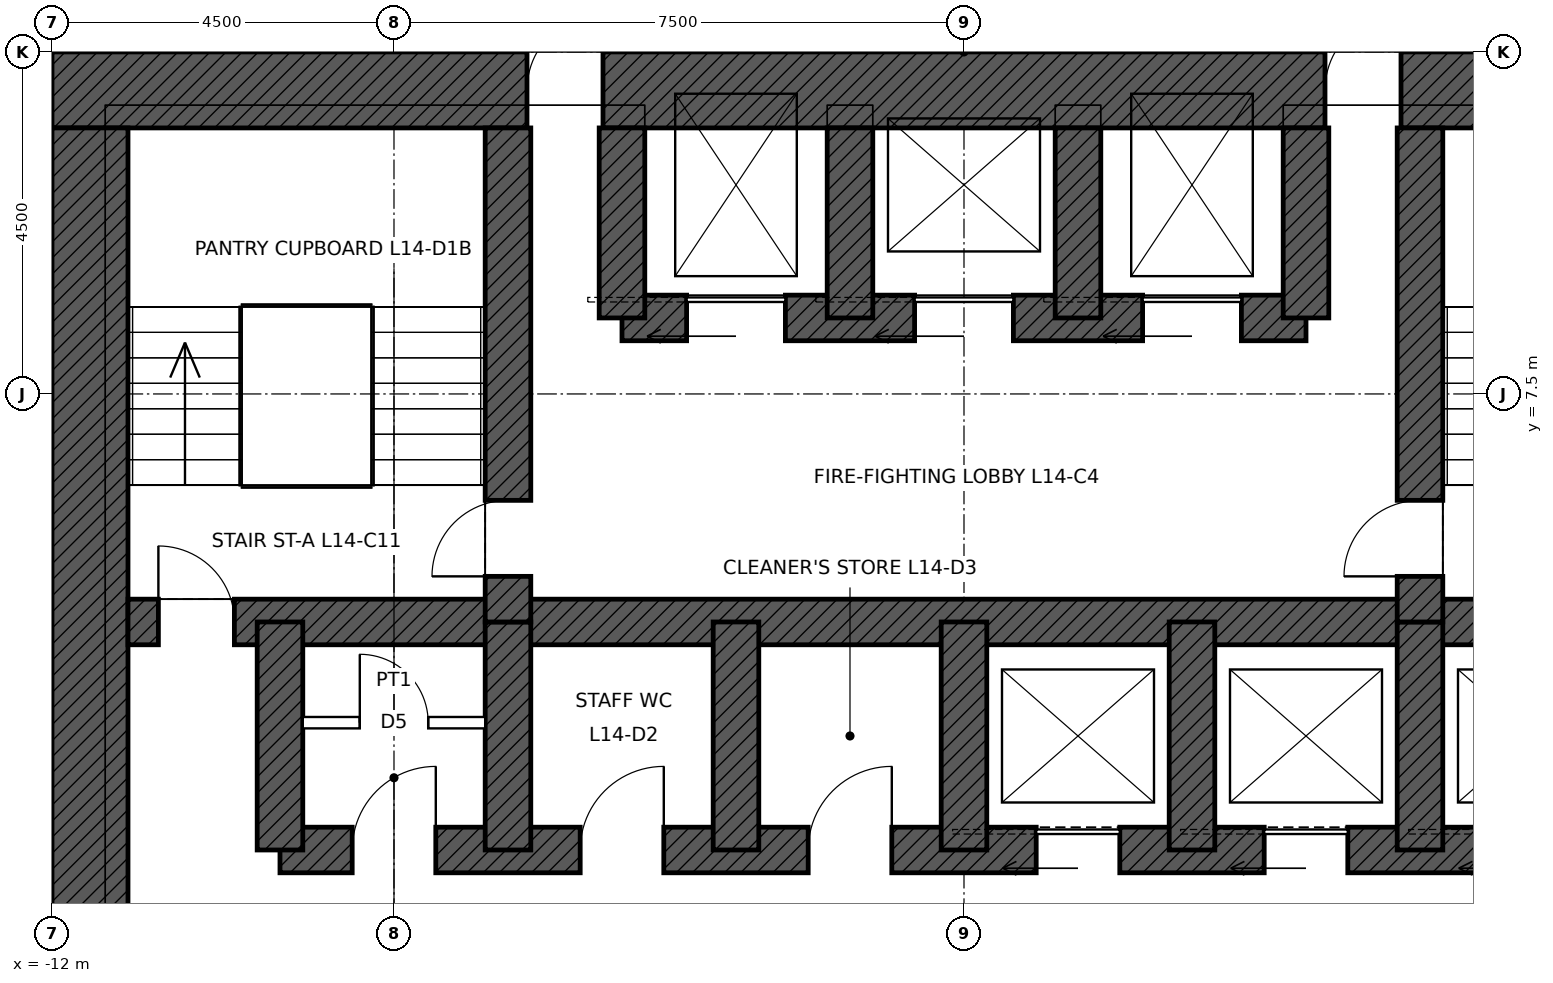
"""IFC4 building model, lengths in metres.
Left out: names, types, materials, properties, quantities, classifications, styles, units other than length and angle.
Written with IfcOpenShell. Run it as: python <this file> out.ifc"""

import sys

from ifc_helpers import new_model, si_unit, direction, frame, frame_2d, origin, place, context, subcontext, project, spatial, rectangle, extrude, element, fill, save


model = new_model("IFC4")
c1 = context("Model", 3, precision=1e-05, world=origin(), true_north=direction((0.0, 1.0)))
c2 = subcontext(c1, "Body", "Model", "MODEL_VIEW")
j1 = project(units=[si_unit("LENGTHUNIT", "METRE"), si_unit("PLANEANGLEUNIT", "RADIAN")], contexts=[c1])
p1 = place(None, origin())
s1 = spatial("IfcSite", under=j1, at=p1, CompositionType="ELEMENT")
p2 = place(p1, origin())
s2 = spatial("IfcBuilding", under=s1, at=p2, CompositionType="ELEMENT")
p3 = place(p2, frame((0.0, 0.0, 73.4)))
s3 = spatial("IfcBuildingStorey", under=s2, at=p3, CompositionType="ELEMENT", Elevation=73.4)
p4 = place(p3, frame((-12.0, 11.5, 0.0), z_axis=(0.0, 0.0, 1.0), x_axis=(1.0, 0.0, 0.0)))
e1 = element("IfcWall", 1, at=p4, inside=s3, PredefinedType="SHEAR", context=c2, shape_type="SweptSolid", body=[
    extrude(rectangle(XDim=24.0, YDim=1.0, at=frame_2d((12.0, 0.0))), origin(), (0.0, 0.0, 1.0), 5.0),
])
p5 = place(p4, frame((6.25, 0.0, 0.0)))
e2 = element("IfcOpeningElement", 2, at=p5, cuts=e1, PredefinedType="OPENING", context=c2, shape_type="SweptSolid", body=[
    extrude(rectangle(XDim=1.0, YDim=2.4, at=frame_2d((0.5, 1.2))), frame((0.0, 0.51, 0.0), z_axis=(0.0, -1.0, 0.0), x_axis=(1.0, 0.0, 0.0)), (0.0, 0.0, 1.0), 1.02),
])
p6 = place(p4, frame((16.75, 0.0, 0.0)))
e3 = element("IfcOpeningElement", 3, at=p6, cuts=e1, PredefinedType="OPENING", context=c2, shape_type="SweptSolid", body=[
    extrude(rectangle(XDim=1.0, YDim=2.4, at=frame_2d((0.5, 1.2))), frame((0.0, 0.51, 0.0), z_axis=(0.0, -1.0, 0.0), x_axis=(1.0, 0.0, 0.0)), (0.0, 0.0, 1.0), 1.02),
])
p7 = place(p3, frame((-11.5, -11.0, 0.0), z_axis=(0.0, 0.0, 1.0), x_axis=(0.0, 1.0, 0.0)))
e4 = element("IfcWall", 4, at=p7, inside=s3, PredefinedType="SHEAR", context=c2, shape_type="SweptSolid", body=[
    extrude(rectangle(XDim=22.0, YDim=1.0, at=frame_2d((11.0, 0.0))), origin(), (0.0, 0.0, 1.0), 5.0),
])
p8 = place(p7, frame((10.5, 0.0, 0.0)))
e5 = element("IfcOpeningElement", 5, at=p8, cuts=e4, PredefinedType="OPENING", context=c2, shape_type="SweptSolid", body=[
    extrude(rectangle(XDim=1.0, YDim=2.4, at=frame_2d((0.5, 1.2))), frame((0.0, 0.51, 0.0), z_axis=(0.0, -1.0, 0.0), x_axis=(1.0, 0.0, 0.0)), (0.0, 0.0, 1.0), 1.02),
])
p9 = place(p3, frame((-11.0, 4.5, 0.0), z_axis=(0.0, 0.0, 1.0), x_axis=(1.0, 0.0, 0.0)))
e6 = element("IfcWall", 6, at=p9, inside=s3, PredefinedType="SHEAR", context=c2, shape_type="SweptSolid", body=[
    extrude(rectangle(XDim=22.0, YDim=0.6, at=frame_2d((11.0, 0.0))), origin(), (0.0, 0.0, 1.0), 5.0),
])
p10 = place(p9, frame((0.4, 0.0, 0.0)))
e7 = element("IfcOpeningElement", 7, at=p10, cuts=e6, PredefinedType="OPENING", context=c2, shape_type="SweptSolid", body=[
    extrude(rectangle(XDim=1.0, YDim=2.1, at=frame_2d((0.5, 1.05))), frame((0.0, 0.31, 0.0), z_axis=(0.0, -1.0, 0.0), x_axis=(1.0, 0.0, 0.0)), (0.0, 0.0, 1.0), 0.62),
])
p11 = place(p9, frame((20.6, 0.0, 0.0)))
e8 = element("IfcOpeningElement", 8, at=p11, cuts=e6, PredefinedType="OPENING", context=c2, shape_type="SweptSolid", body=[
    extrude(rectangle(XDim=1.0, YDim=2.1, at=frame_2d((0.5, 1.05))), frame((0.0, 0.31, 0.0), z_axis=(0.0, -1.0, 0.0), x_axis=(1.0, 0.0, 0.0)), (0.0, 0.0, 1.0), 0.62),
])
p12 = place(p3, frame((-9.0, 1.5, 0.0), z_axis=(0.0, 0.0, 1.0), x_axis=(1.0, 0.0, 0.0)))
e9 = element("IfcWall", 9, at=p12, inside=s3, PredefinedType="SHEAR", context=c2, shape_type="SweptSolid", body=[
    extrude(rectangle(XDim=18.0, YDim=0.6, at=frame_2d((9.0, 0.0))), origin(), (0.0, 0.0, 1.0), 5.0),
])
p13 = place(p12, frame((9.95, 0.0, 0.0)))
e10 = element("IfcOpeningElement", 10, at=p13, cuts=e9, PredefinedType="OPENING", context=c2, shape_type="SweptSolid", body=[
    extrude(rectangle(XDim=1.1, YDim=2.1, at=frame_2d((0.55, 1.05))), frame((0.0, 0.31, 0.0), z_axis=(0.0, -1.0, 0.0), x_axis=(1.0, 0.0, 0.0)), (0.0, 0.0, 1.0), 0.62),
])
p14 = place(p12, frame((12.95, 0.0, 0.0)))
e11 = element("IfcOpeningElement", 11, at=p14, cuts=e9, PredefinedType="OPENING", context=c2, shape_type="SweptSolid", body=[
    extrude(rectangle(XDim=1.1, YDim=2.1, at=frame_2d((0.55, 1.05))), frame((0.0, 0.31, 0.0), z_axis=(0.0, -1.0, 0.0), x_axis=(1.0, 0.0, 0.0)), (0.0, 0.0, 1.0), 0.62),
])
p15 = place(p12, frame((15.95, 0.0, 0.0)))
e12 = element("IfcOpeningElement", 12, at=p15, cuts=e9, PredefinedType="OPENING", context=c2, shape_type="SweptSolid", body=[
    extrude(rectangle(XDim=1.1, YDim=2.1, at=frame_2d((0.55, 1.05))), frame((0.0, 0.31, 0.0), z_axis=(0.0, -1.0, 0.0), x_axis=(1.0, 0.0, 0.0)), (0.0, 0.0, 1.0), 0.62),
])
p16 = place(p12, frame((0.95, 0.0, 0.0)))
e13 = element("IfcOpeningElement", 13, at=p16, cuts=e9, PredefinedType="OPENING", context=c2, shape_type="SweptSolid", body=[
    extrude(rectangle(XDim=1.1, YDim=2.1, at=frame_2d((0.55, 1.05))), frame((0.0, 0.31, 0.0), z_axis=(0.0, -1.0, 0.0), x_axis=(1.0, 0.0, 0.0)), (0.0, 0.0, 1.0), 0.62),
])
p17 = place(p12, frame((3.95, 0.0, 0.0)))
e14 = element("IfcOpeningElement", 14, at=p17, cuts=e9, PredefinedType="OPENING", context=c2, shape_type="SweptSolid", body=[
    extrude(rectangle(XDim=1.1, YDim=2.1, at=frame_2d((0.55, 1.05))), frame((0.0, 0.31, 0.0), z_axis=(0.0, -1.0, 0.0), x_axis=(1.0, 0.0, 0.0)), (0.0, 0.0, 1.0), 0.62),
])
p18 = place(p12, frame((6.95, 0.0, 0.0)))
e15 = element("IfcOpeningElement", 15, at=p18, cuts=e9, PredefinedType="OPENING", context=c2, shape_type="SweptSolid", body=[
    extrude(rectangle(XDim=1.1, YDim=2.1, at=frame_2d((0.55, 1.05))), frame((0.0, 0.31, 0.0), z_axis=(0.0, -1.0, 0.0), x_axis=(1.0, 0.0, 0.0)), (0.0, 0.0, 1.0), 0.62),
])
p19 = place(p3, frame((-4.5, 8.5, 0.0), z_axis=(0.0, 0.0, 1.0), x_axis=(1.0, 0.0, 0.0)))
e16 = element("IfcWall", 16, at=p19, inside=s3, PredefinedType="SHEAR", context=c2, shape_type="SweptSolid", body=[
    extrude(rectangle(XDim=9.0, YDim=0.6, at=frame_2d((4.5, 0.0))), origin(), (0.0, 0.0, 1.0), 5.0),
])
p20 = place(p19, frame((0.85, 0.0, 0.0)))
e17 = element("IfcOpeningElement", 17, at=p20, cuts=e16, PredefinedType="OPENING", context=c2, shape_type="SweptSolid", body=[
    extrude(rectangle(XDim=1.3, YDim=2.4, at=frame_2d((0.65, 1.2))), frame((0.0, 0.31, 0.0), z_axis=(0.0, -1.0, 0.0), x_axis=(1.0, 0.0, 0.0)), (0.0, 0.0, 1.0), 0.62),
])
p21 = place(p19, frame((6.85, 0.0, 0.0)))
e18 = element("IfcOpeningElement", 18, at=p21, cuts=e16, PredefinedType="OPENING", context=c2, shape_type="SweptSolid", body=[
    extrude(rectangle(XDim=1.3, YDim=2.4, at=frame_2d((0.65, 1.2))), frame((0.0, 0.31, 0.0), z_axis=(0.0, -1.0, 0.0), x_axis=(1.0, 0.0, 0.0)), (0.0, 0.0, 1.0), 0.62),
])
p22 = place(p19, frame((3.85, 0.0, 0.0)))
e19 = element("IfcOpeningElement", 19, at=p22, cuts=e16, PredefinedType="OPENING", context=c2, shape_type="SweptSolid", body=[
    extrude(rectangle(XDim=1.3, YDim=2.4, at=frame_2d((0.65, 1.2))), frame((0.0, 0.31, 0.0), z_axis=(0.0, -1.0, 0.0), x_axis=(1.0, 0.0, 0.0)), (0.0, 0.0, 1.0), 0.62),
])
for number, where, z_axis, x_axis in (
    (20, (-9.0, 1.5, 0.0), (0.0, 0.0, 1.0), (0.0, 1.0, 0.0)),
    (21, (-6.0, 1.5, 0.0), (0.0, 0.0, 1.0), (0.0, 1.0, 0.0)),
    (22, (-3.0, 1.5, 0.0), (0.0, 0.0, 1.0), (0.0, 1.0, 0.0)),
    (23, (0.0, 1.5, 0.0), (0.0, 0.0, 1.0), (0.0, 1.0, 0.0)),
    (24, (3.0, 1.5, 0.0), (0.0, 0.0, 1.0), (0.0, 1.0, 0.0)),
    (25, (6.0, 1.5, 0.0), (0.0, 0.0, 1.0), (0.0, 1.0, 0.0)),
):
    element("IfcWall", number, at=place(p3, frame(where, z_axis=z_axis, x_axis=x_axis)), inside=s3, PredefinedType="SHEAR", context=c2, shape_type="SweptSolid", body=[
        extrude(rectangle(XDim=3.0, YDim=0.6, at=frame_2d((1.5, 0.0))), origin(), (0.0, 0.0, 1.0), 5.0),
    ])
p23 = place(p3, frame((-6.0, 4.5, 0.0), z_axis=(0.0, 0.0, 1.0), x_axis=(0.0, 1.0, 0.0)))
e26 = element("IfcWall", 26, at=p23, inside=s3, PredefinedType="SHEAR", context=c2, shape_type="SweptSolid", body=[
    extrude(rectangle(XDim=6.5, YDim=0.6, at=frame_2d((3.25, 0.0))), origin(), (0.0, 0.0, 1.0), 5.0),
])
p24 = place(p23, frame((0.6, 0.0, 0.0)))
e27 = element("IfcOpeningElement", 27, at=p24, cuts=e26, PredefinedType="OPENING", context=c2, shape_type="SweptSolid", body=[
    extrude(rectangle(XDim=1.0, YDim=2.1, at=frame_2d((0.5, 1.05))), frame((0.0, 0.31, 0.0), z_axis=(0.0, -1.0, 0.0), x_axis=(1.0, 0.0, 0.0)), (0.0, 0.0, 1.0), 0.62),
])
p25 = place(p3, frame((6.0, 4.5, 0.0), z_axis=(0.0, 0.0, 1.0), x_axis=(0.0, 1.0, 0.0)))
e28 = element("IfcWall", 28, at=p25, inside=s3, PredefinedType="SHEAR", context=c2, shape_type="SweptSolid", body=[
    extrude(rectangle(XDim=6.5, YDim=0.6, at=frame_2d((3.25, 0.0))), origin(), (0.0, 0.0, 1.0), 5.0),
])
p26 = place(p25, frame((0.6, 0.0, 0.0)))
e29 = element("IfcOpeningElement", 29, at=p26, cuts=e28, PredefinedType="OPENING", context=c2, shape_type="SweptSolid", body=[
    extrude(rectangle(XDim=1.0, YDim=2.1, at=frame_2d((0.5, 1.05))), frame((0.0, 0.31, 0.0), z_axis=(0.0, -1.0, 0.0), x_axis=(1.0, 0.0, 0.0)), (0.0, 0.0, 1.0), 0.62),
])
for number, where, z_axis, x_axis in (
    (30, (-4.5, 8.5, 0.0), (0.0, 0.0, 1.0), (0.0, 1.0, 0.0)),
    (31, (4.5, 8.5, 0.0), (0.0, 0.0, 1.0), (0.0, 1.0, 0.0)),
    (32, (-1.5, 8.5, 0.0), (0.0, 0.0, 1.0), (0.0, 1.0, 0.0)),
    (33, (1.5, 8.5, 0.0), (0.0, 0.0, 1.0), (0.0, 1.0, 0.0)),
):
    element("IfcWall", number, at=place(p3, frame(where, z_axis=z_axis, x_axis=x_axis)), inside=s3, PredefinedType="SHEAR", context=c2, shape_type="SweptSolid", body=[
        extrude(rectangle(XDim=2.5, YDim=0.6, at=frame_2d((1.25, 0.0))), origin(), (0.0, 0.0, 1.0), 5.0),
    ])
p27 = place(p3, frame((-8.7, 3.175, 0.0), z_axis=(0.0, 0.0, 1.0), x_axis=(1.0, 0.0, 0.0)))
e34 = element("IfcWall", 34, at=p27, inside=s3, PredefinedType="PARTITIONING", context=c2, shape_type="SweptSolid", body=[
    extrude(rectangle(XDim=2.4, YDim=0.15, at=frame_2d((1.2, 0.0))), origin(), (0.0, 0.0, 1.0), 4.75),
])
p28 = place(p27, frame((0.75, 0.0, 0.0)))
e35 = element("IfcOpeningElement", 35, at=p28, cuts=e34, PredefinedType="OPENING", context=c2, shape_type="SweptSolid", body=[
    extrude(rectangle(XDim=0.9, YDim=2.1, at=frame_2d((0.45, 1.05))), frame((0.0, 0.085, 0.0), z_axis=(0.0, -1.0, 0.0), x_axis=(1.0, 0.0, 0.0)), (0.0, 0.0, 1.0), 0.17),
])
p29 = place(p10, origin())
e36 = element("IfcDoor", 36, at=p29, inside=s3, OperationType="SINGLE_SWING_LEFT", PredefinedType="DOOR", context=c2, shape_type="SweptSolid", body=[
    extrude(rectangle(XDim=1.0, YDim=2.1, at=frame_2d((0.5, 1.05))), frame((0.0, 0.025, 0.0), z_axis=(0.0, -1.0, 0.0), x_axis=(1.0, 0.0, 0.0)), (0.0, 0.0, 1.0), 0.05),
])
fill(e7, e36)
p30 = place(p24, origin())
e37 = element("IfcDoor", 37, at=p30, inside=s3, OperationType="SINGLE_SWING_LEFT", PredefinedType="DOOR", context=c2, shape_type="SweptSolid", body=[
    extrude(rectangle(XDim=1.0, YDim=2.1, at=frame_2d((0.5, 1.05))), frame((0.0, 0.025, 0.0), z_axis=(0.0, -1.0, 0.0), x_axis=(1.0, 0.0, 0.0)), (0.0, 0.0, 1.0), 0.05),
])
fill(e27, e37)
p31 = place(p26, origin())
e38 = element("IfcDoor", 38, at=p31, inside=s3, OperationType="SINGLE_SWING_LEFT", PredefinedType="DOOR", context=c2, shape_type="SweptSolid", body=[
    extrude(rectangle(XDim=1.0, YDim=2.1, at=frame_2d((0.5, 1.05))), frame((0.0, 0.025, 0.0), z_axis=(0.0, -1.0, 0.0), x_axis=(1.0, 0.0, 0.0)), (0.0, 0.0, 1.0), 0.05),
])
fill(e29, e38)
p32 = place(p5, origin())
e39 = element("IfcDoor", 39, at=p32, inside=s3, OperationType="SINGLE_SWING_RIGHT", PredefinedType="DOOR", context=c2, shape_type="SweptSolid", body=[
    extrude(rectangle(XDim=1.0, YDim=2.4, at=frame_2d((0.5, 1.2))), frame((0.0, 0.485, 0.0), z_axis=(0.0, -1.0, 0.0), x_axis=(1.0, 0.0, 0.0)), (0.0, 0.0, 1.0), 0.05),
])
fill(e2, e39)
p33 = place(p6, origin())
e40 = element("IfcDoor", 40, at=p33, inside=s3, OperationType="SINGLE_SWING_RIGHT", PredefinedType="DOOR", context=c2, shape_type="SweptSolid", body=[
    extrude(rectangle(XDim=1.0, YDim=2.4, at=frame_2d((0.5, 1.2))), frame((0.0, 0.485, 0.0), z_axis=(0.0, -1.0, 0.0), x_axis=(1.0, 0.0, 0.0)), (0.0, 0.0, 1.0), 0.05),
])
fill(e3, e40)
p34 = place(p20, origin())
e41 = element("IfcDoor", 41, at=p34, inside=s3, OperationType="SLIDING_TO_LEFT", PredefinedType="DOOR", context=c2, shape_type="SweptSolid", body=[
    extrude(rectangle(XDim=1.3, YDim=2.4, at=frame_2d((0.65, 1.2))), frame((0.0, 0.025, 0.0), z_axis=(0.0, -1.0, 0.0), x_axis=(1.0, 0.0, 0.0)), (0.0, 0.0, 1.0), 0.05),
])
fill(e17, e41)
p35 = place(p21, origin())
e42 = element("IfcDoor", 42, at=p35, inside=s3, OperationType="SLIDING_TO_LEFT", PredefinedType="DOOR", context=c2, shape_type="SweptSolid", body=[
    extrude(rectangle(XDim=1.3, YDim=2.4, at=frame_2d((0.65, 1.2))), frame((0.0, 0.025, 0.0), z_axis=(0.0, -1.0, 0.0), x_axis=(1.0, 0.0, 0.0)), (0.0, 0.0, 1.0), 0.05),
])
fill(e18, e42)
p36 = place(p22, origin())
e43 = element("IfcDoor", 43, at=p36, inside=s3, OperationType="SLIDING_TO_LEFT", PredefinedType="DOOR", context=c2, shape_type="SweptSolid", body=[
    extrude(rectangle(XDim=1.3, YDim=2.4, at=frame_2d((0.65, 1.2))), frame((0.0, 0.025, 0.0), z_axis=(0.0, -1.0, 0.0), x_axis=(1.0, 0.0, 0.0)), (0.0, 0.0, 1.0), 0.05),
])
fill(e19, e43)
p37 = place(p13, origin())
e44 = element("IfcDoor", 44, at=p37, inside=s3, OperationType="SLIDING_TO_LEFT", PredefinedType="DOOR", context=c2, shape_type="SweptSolid", body=[
    extrude(rectangle(XDim=1.1, YDim=2.1, at=frame_2d((0.55, 1.05))), frame((0.0, 0.025, 0.0), z_axis=(0.0, -1.0, 0.0), x_axis=(1.0, 0.0, 0.0)), (0.0, 0.0, 1.0), 0.05),
])
fill(e10, e44)
p38 = place(p14, origin())
e45 = element("IfcDoor", 45, at=p38, inside=s3, OperationType="SLIDING_TO_LEFT", PredefinedType="DOOR", context=c2, shape_type="SweptSolid", body=[
    extrude(rectangle(XDim=1.1, YDim=2.1, at=frame_2d((0.55, 1.05))), frame((0.0, 0.025, 0.0), z_axis=(0.0, -1.0, 0.0), x_axis=(1.0, 0.0, 0.0)), (0.0, 0.0, 1.0), 0.05),
])
fill(e11, e45)
p39 = place(p16, origin())
e46 = element("IfcDoor", 46, at=p39, inside=s3, OperationType="SINGLE_SWING_RIGHT", PredefinedType="DOOR", context=c2, shape_type="SweptSolid", body=[
    extrude(rectangle(XDim=1.1, YDim=2.1, at=frame_2d((0.55, 1.05))), frame((0.0, 0.025, 0.0), z_axis=(0.0, -1.0, 0.0), x_axis=(1.0, 0.0, 0.0)), (0.0, 0.0, 1.0), 0.05),
])
fill(e13, e46)
p40 = place(p28, origin())
e47 = element("IfcDoor", 47, at=p40, inside=s3, OperationType="SINGLE_SWING_LEFT", PredefinedType="DOOR", context=c2, shape_type="SweptSolid", body=[
    extrude(rectangle(XDim=0.9, YDim=2.1, at=frame_2d((0.45, 1.05))), frame((0.0, 0.025, 0.0), z_axis=(0.0, -1.0, 0.0), x_axis=(1.0, 0.0, 0.0)), (0.0, 0.0, 1.0), 0.05),
])
fill(e35, e47)
p41 = place(p17, origin())
e48 = element("IfcDoor", 48, at=p41, inside=s3, OperationType="SINGLE_SWING_RIGHT", PredefinedType="DOOR", context=c2, shape_type="SweptSolid", body=[
    extrude(rectangle(XDim=1.1, YDim=2.1, at=frame_2d((0.55, 1.05))), frame((0.0, 0.025, 0.0), z_axis=(0.0, -1.0, 0.0), x_axis=(1.0, 0.0, 0.0)), (0.0, 0.0, 1.0), 0.05),
])
fill(e14, e48)
p42 = place(p18, origin())
e49 = element("IfcDoor", 49, at=p42, inside=s3, OperationType="SINGLE_SWING_RIGHT", PredefinedType="DOOR", context=c2, shape_type="SweptSolid", body=[
    extrude(rectangle(XDim=1.1, YDim=2.1, at=frame_2d((0.55, 1.05))), frame((0.0, 0.025, 0.0), z_axis=(0.0, -1.0, 0.0), x_axis=(1.0, 0.0, 0.0)), (0.0, 0.0, 1.0), 0.05),
])
fill(e15, e49)
save(model, sys.argv[1])
